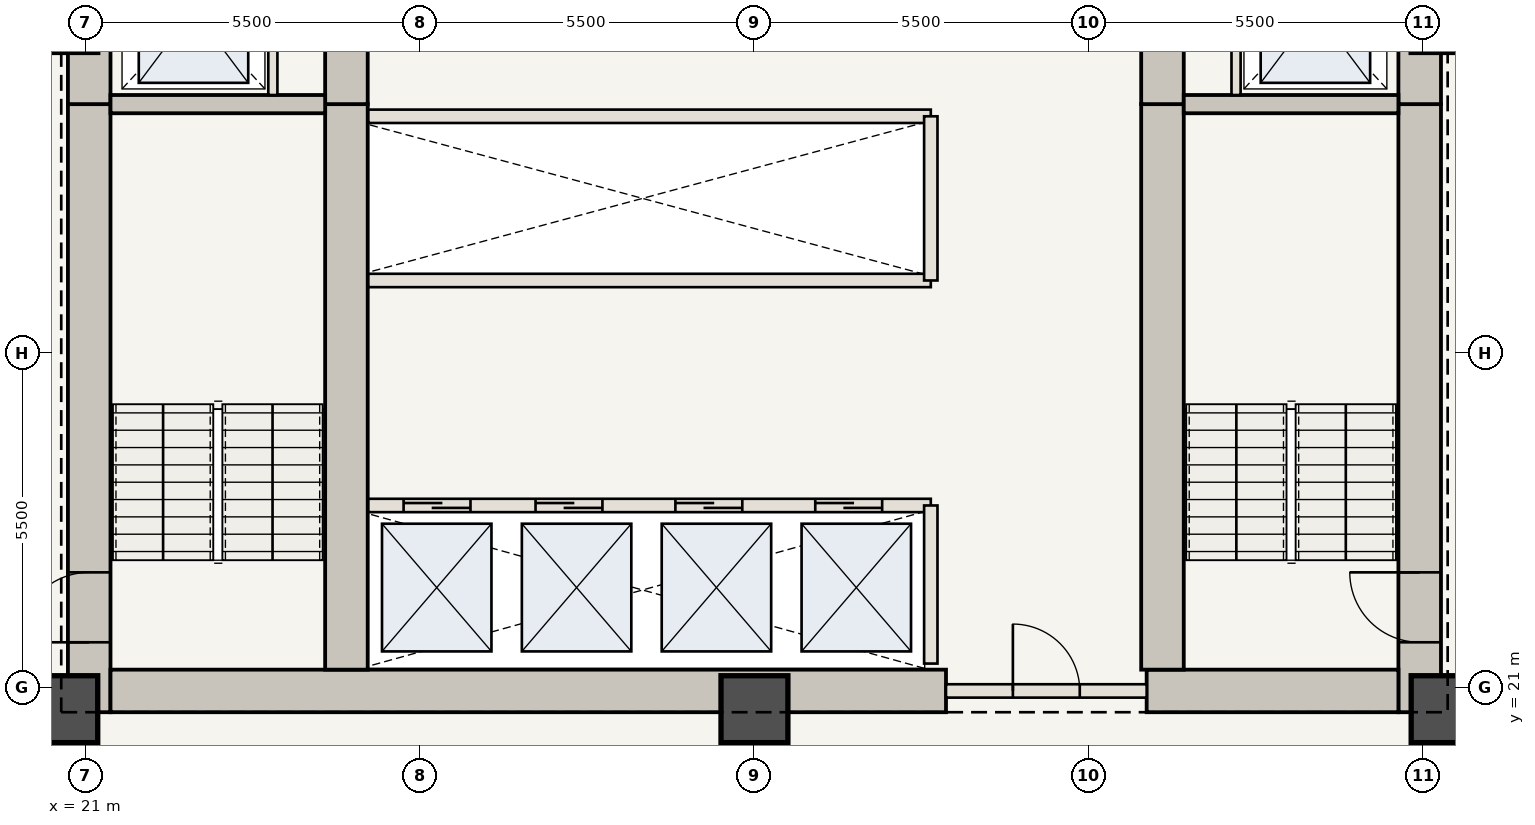
"""IFC4 building model, lengths in metres.
Left out: names, types, materials, properties, quantities, classifications, styles, units other than length and angle.
Written with IfcOpenShell. Run it as: python <this file> out.ifc"""

import sys

from ifc_helpers import new_model, si_unit, direction, frame, frame_2d, origin, origin_2d, place, context, subcontext, project, spatial, rectangle, extrude, element, fill, save


model = new_model("IFC4")
c1 = context("Model", 3, precision=1e-05, world=origin(), true_north=direction((0.0, 1.0)))
c2 = subcontext(c1, "Body", "Model", "MODEL_VIEW")
j1 = project(units=[si_unit("LENGTHUNIT", "METRE"), si_unit("PLANEANGLEUNIT", "RADIAN")], contexts=[c1])
p1 = place(None, origin())
s1 = spatial("IfcSite", under=j1, at=p1, CompositionType="ELEMENT")
p2 = place(p1, origin())
s2 = spatial("IfcBuilding", under=s1, at=p2, CompositionType="ELEMENT")
p3 = place(p2, frame((0.0, 0.0, 59.85)))
s3 = spatial("IfcBuildingStorey", under=s2, at=p3, CompositionType="ELEMENT", Elevation=59.85)
p4 = place(p3, frame((21.06, 20.6, 0.0), z_axis=(0.0, 0.0, 1.0), x_axis=(0.0, 1.0, 0.0)))
e1 = element("IfcWall", 1, at=p4, inside=s3, PredefinedType="SHEAR", context=c2, shape_type="SweptSolid", body=[
    extrude(rectangle(XDim=10.0, YDim=0.7, at=frame_2d((5.0, 0.0))), origin(), (0.0, 0.0, 1.0), 3.5),
])
p5 = place(p4, frame((1.15, 0.0, 0.0)))
e2 = element("IfcOpeningElement", 2, at=p5, cuts=e1, PredefinedType="OPENING", context=c2, shape_type="SweptSolid", body=[
    extrude(rectangle(XDim=1.15, YDim=2.15, at=frame_2d((0.575, 1.075))), frame((0.0, 0.36, 0.0), z_axis=(0.0, -1.0, 0.0), x_axis=(1.0, 0.0, 0.0)), (0.0, 0.0, 1.0), 0.72),
])
p6 = place(p3, frame((21.06, 30.6, 0.0), z_axis=(0.0, 0.0, 1.0), x_axis=(0.0, 1.0, 0.0)))
e3 = element("IfcWall", 3, at=p6, inside=s3, PredefinedType="SHEAR", context=c2, shape_type="SweptSolid", body=[
    extrude(rectangle(XDim=12.75, YDim=0.7, at=frame_2d((6.375, 0.0))), origin(), (0.0, 0.0, 1.0), 3.5),
])
p7 = place(p6, frame((4.2, 0.0, 0.0)))
e4 = element("IfcOpeningElement", 4, at=p7, cuts=e3, PredefinedType="OPENING", context=c2, shape_type="SweptSolid", body=[
    extrude(rectangle(XDim=1.1, YDim=2.15, at=frame_2d((0.55, 1.075))), frame((0.0, 0.36, 0.0), z_axis=(0.0, -1.0, 0.0), x_axis=(1.0, 0.0, 0.0)), (0.0, 0.0, 1.0), 0.72),
])
p8 = place(p6, frame((9.2, 0.0, 0.0)))
e5 = element("IfcOpeningElement", 5, at=p8, cuts=e3, PredefinedType="OPENING", context=c2, shape_type="SweptSolid", body=[
    extrude(rectangle(XDim=0.92, YDim=2.1, at=frame_2d((0.46, 1.05))), frame((0.0, 0.36, 0.0), z_axis=(0.0, -1.0, 0.0), x_axis=(1.0, 0.0, 0.0)), (0.0, 0.0, 1.0), 0.72),
])
p9 = place(p3, frame((42.94, 20.6, 0.0), z_axis=(0.0, 0.0, 1.0), x_axis=(0.0, 1.0, 0.0)))
e6 = element("IfcWall", 6, at=p9, inside=s3, PredefinedType="SHEAR", context=c2, shape_type="SweptSolid", body=[
    extrude(rectangle(XDim=10.0, YDim=0.7, at=frame_2d((5.0, 0.0))), origin(), (0.0, 0.0, 1.0), 3.5),
])
p10 = place(p9, frame((1.15, 0.0, 0.0)))
e7 = element("IfcOpeningElement", 7, at=p10, cuts=e6, PredefinedType="OPENING", context=c2, shape_type="SweptSolid", body=[
    extrude(rectangle(XDim=1.15, YDim=2.15, at=frame_2d((0.575, 1.075))), frame((0.0, 0.36, 0.0), z_axis=(0.0, -1.0, 0.0), x_axis=(1.0, 0.0, 0.0)), (0.0, 0.0, 1.0), 0.72),
])
p11 = place(p3, frame((42.94, 30.6, 0.0), z_axis=(0.0, 0.0, 1.0), x_axis=(0.0, 1.0, 0.0)))
e8 = element("IfcWall", 8, at=p11, inside=s3, PredefinedType="SHEAR", context=c2, shape_type="SweptSolid", body=[
    extrude(rectangle(XDim=12.75, YDim=0.7, at=frame_2d((6.375, 0.0))), origin(), (0.0, 0.0, 1.0), 3.5),
])
p12 = place(p11, frame((4.2, 0.0, 0.0)))
e9 = element("IfcOpeningElement", 9, at=p12, cuts=e8, PredefinedType="OPENING", context=c2, shape_type="SweptSolid", body=[
    extrude(rectangle(XDim=1.1, YDim=2.15, at=frame_2d((0.55, 1.075))), frame((0.0, 0.36, 0.0), z_axis=(0.0, -1.0, 0.0), x_axis=(1.0, 0.0, 0.0)), (0.0, 0.0, 1.0), 0.72),
])
p13 = place(p11, frame((8.4, 0.0, 0.0)))
e10 = element("IfcOpeningElement", 10, at=p13, cuts=e8, PredefinedType="OPENING", context=c2, shape_type="SweptSolid", body=[
    extrude(rectangle(XDim=0.88, YDim=2.1, at=frame_2d((0.44, 1.05))), frame((0.0, 0.36, 0.0), z_axis=(0.0, -1.0, 0.0), x_axis=(1.0, 0.0, 0.0)), (0.0, 0.0, 1.0), 0.72),
])
p14 = place(p11, frame((10.5, 0.0, 0.0)))
e11 = element("IfcOpeningElement", 11, at=p14, cuts=e8, PredefinedType="OPENING", context=c2, shape_type="SweptSolid", body=[
    extrude(rectangle(XDim=0.88, YDim=2.1, at=frame_2d((0.44, 1.05))), frame((0.0, 0.36, 0.0), z_axis=(0.0, -1.0, 0.0), x_axis=(1.0, 0.0, 0.0)), (0.0, 0.0, 1.0), 0.72),
])
p15 = place(p3, frame((21.41, 20.95, 0.0), z_axis=(0.0, 0.0, 1.0), x_axis=(1.0, 0.0, 0.0)))
e12 = element("IfcWall", 12, at=p15, inside=s3, PredefinedType="SHEAR", context=c2, shape_type="SweptSolid", body=[
    extrude(rectangle(XDim=13.74, YDim=0.7, at=frame_2d((6.87, 0.0))), origin(), (0.0, 0.0, 1.0), 3.5),
])
p16 = place(p3, frame((38.45, 20.95, 0.0), z_axis=(0.0, 0.0, 1.0), x_axis=(1.0, 0.0, 0.0)))
e13 = element("IfcWall", 13, at=p16, inside=s3, PredefinedType="SHEAR", context=c2, shape_type="SweptSolid", body=[
    extrude(rectangle(XDim=4.14, YDim=0.7, at=frame_2d((2.07, 0.0))), origin(), (0.0, 0.0, 1.0), 3.5),
])
p17 = place(p3, frame((25.29, 21.3, 0.0), z_axis=(0.0, 0.0, 1.0), x_axis=(0.0, 1.0, 0.0)))
e14 = element("IfcWall", 14, at=p17, inside=s3, PredefinedType="SHEAR", context=c2, shape_type="SweptSolid", body=[
    extrude(rectangle(XDim=9.3, YDim=0.7, at=frame_2d((4.65, 0.0))), origin(), (0.0, 0.0, 1.0), 3.5),
])
p18 = place(p3, frame((25.29, 30.6, 0.0), z_axis=(0.0, 0.0, 1.0), x_axis=(0.0, 1.0, 0.0)))
e15 = element("IfcWall", 15, at=p18, inside=s3, PredefinedType="SHEAR", context=c2, shape_type="SweptSolid", body=[
    extrude(rectangle(XDim=12.05, YDim=0.7, at=frame_2d((6.025, 0.0))), origin(), (0.0, 0.0, 1.0), 3.5),
])
p19 = place(p18, frame((6.25, 0.0, 0.0)))
e16 = element("IfcOpeningElement", 16, at=p19, cuts=e15, PredefinedType="OPENING", context=c2, shape_type="SweptSolid", body=[
    extrude(rectangle(XDim=1.1, YDim=2.15, at=frame_2d((0.55, 1.075))), frame((0.0, 0.36, 0.0), z_axis=(0.0, -1.0, 0.0), x_axis=(1.0, 0.0, 0.0)), (0.0, 0.0, 1.0), 0.72),
])
p20 = place(p3, frame((38.71, 21.3, 0.0), z_axis=(0.0, 0.0, 1.0), x_axis=(0.0, 1.0, 0.0)))
e17 = element("IfcWall", 17, at=p20, inside=s3, PredefinedType="SHEAR", context=c2, shape_type="SweptSolid", body=[
    extrude(rectangle(XDim=9.3, YDim=0.7, at=frame_2d((4.65, 0.0))), origin(), (0.0, 0.0, 1.0), 3.5),
])
p21 = place(p3, frame((38.71, 30.6, 0.0), z_axis=(0.0, 0.0, 1.0), x_axis=(0.0, 1.0, 0.0)))
e18 = element("IfcWall", 18, at=p21, inside=s3, PredefinedType="SHEAR", context=c2, shape_type="SweptSolid", body=[
    extrude(rectangle(XDim=12.05, YDim=0.7, at=frame_2d((6.025, 0.0))), origin(), (0.0, 0.0, 1.0), 3.5),
])
for number, where, z_axis, x_axis in (
    (19, (20.65, 20.65, 0.0), (0.0, 0.0, 1.0), (1.0, 0.0, 0.0)),
    (20, (32.0, 20.65, 0.0), (0.0, 0.0, 1.0), (1.0, 0.0, 0.0)),
    (21, (43.35, 20.65, 0.0), (0.0, 0.0, 1.0), (1.0, 0.0, 0.0)),
):
    element("IfcColumn", number, at=place(p3, frame(where, z_axis=z_axis, x_axis=x_axis)), inside=s3, PredefinedType="COLUMN", context=c2, shape_type="SweptSolid", body=[
        extrude(rectangle(XDim=1.1, YDim=1.1, at=origin_2d()), origin(), (0.0, 0.0, 1.0), 3.5),
    ])
for number, where, z_axis, x_axis in (
    (22, (21.41, 30.6, 0.0), (0.0, 0.0, 1.0), (1.0, 0.0, 0.0)),
    (23, (39.06, 30.6, 0.0), (0.0, 0.0, 1.0), (1.0, 0.0, 0.0)),
):
    element("IfcWall", number, at=place(p3, frame(where, z_axis=z_axis, x_axis=x_axis)), inside=s3, PredefinedType="SHEAR", context=c2, shape_type="SweptSolid", body=[
        extrude(rectangle(XDim=3.53, YDim=0.3, at=frame_2d((1.765, 0.0))), origin(), (0.0, 0.0, 1.0), 3.32),
    ])
for number, where, z_axis, x_axis in (
    (24, (24.08, 30.75, 0.0), (0.0, 0.0, 1.0), (0.0, 1.0, 0.0)),
    (25, (39.92, 30.75, 0.0), (0.0, 0.0, 1.0), (0.0, 1.0, 0.0)),
):
    element("IfcWall", number, at=place(p3, frame(where, z_axis=z_axis, x_axis=x_axis)), inside=s3, PredefinedType="STANDARD", context=c2, shape_type="SweptSolid", body=[
        extrude(rectangle(XDim=2.65, YDim=0.15, at=frame_2d((1.325, 0.0))), origin(), (0.0, 0.0, 1.0), 3.32),
    ])
p22 = place(p3, frame((35.15, 20.95, 0.0), z_axis=(0.0, 0.0, 1.0), x_axis=(1.0, 0.0, 0.0)))
e26 = element("IfcWall", 26, at=p22, inside=s3, PredefinedType="STANDARD", context=c2, shape_type="SweptSolid", body=[
    extrude(rectangle(XDim=3.3, YDim=0.22, at=frame_2d((1.65, 0.0))), origin(), (0.0, 0.0, 1.0), 3.32),
])
p23 = place(p22, frame((1.1, 0.0, 0.0)))
e27 = element("IfcOpeningElement", 27, at=p23, cuts=e26, PredefinedType="OPENING", context=c2, shape_type="SweptSolid", body=[
    extrude(rectangle(XDim=1.1, YDim=2.15, at=frame_2d((0.55, 1.075))), frame((0.0, 0.12, 0.0), z_axis=(0.0, -1.0, 0.0), x_axis=(1.0, 0.0, 0.0)), (0.0, 0.0, 1.0), 0.24),
])
p24 = place(p3, frame((25.65, 24.0, 0.0), z_axis=(0.0, 0.0, 1.0), x_axis=(1.0, 0.0, 0.0)))
e28 = element("IfcWall", 28, at=p24, inside=s3, PredefinedType="STANDARD", context=c2, shape_type="SweptSolid", body=[
    extrude(rectangle(XDim=9.25, YDim=0.22, at=frame_2d((4.625, 0.0))), origin(), (0.0, 0.0, 1.0), 3.32),
])
p25 = place(p24, frame((0.58, 0.0, 0.0)))
e29 = element("IfcOpeningElement", 29, at=p25, cuts=e28, PredefinedType="OPENING", context=c2, shape_type="SweptSolid", body=[
    extrude(rectangle(XDim=1.1, YDim=2.15, at=frame_2d((0.55, 1.075))), frame((0.0, 0.12, 0.0), z_axis=(0.0, -1.0, 0.0), x_axis=(1.0, 0.0, 0.0)), (0.0, 0.0, 1.0), 0.24),
])
p26 = place(p24, frame((2.75, 0.0, 0.0)))
e30 = element("IfcOpeningElement", 30, at=p26, cuts=e28, PredefinedType="OPENING", context=c2, shape_type="SweptSolid", body=[
    extrude(rectangle(XDim=1.1, YDim=2.15, at=frame_2d((0.55, 1.075))), frame((0.0, 0.12, 0.0), z_axis=(0.0, -1.0, 0.0), x_axis=(1.0, 0.0, 0.0)), (0.0, 0.0, 1.0), 0.24),
])
p27 = place(p24, frame((5.05, 0.0, 0.0)))
e31 = element("IfcOpeningElement", 31, at=p27, cuts=e28, PredefinedType="OPENING", context=c2, shape_type="SweptSolid", body=[
    extrude(rectangle(XDim=1.1, YDim=2.15, at=frame_2d((0.55, 1.075))), frame((0.0, 0.12, 0.0), z_axis=(0.0, -1.0, 0.0), x_axis=(1.0, 0.0, 0.0)), (0.0, 0.0, 1.0), 0.24),
])
p28 = place(p24, frame((7.35, 0.0, 0.0)))
e32 = element("IfcOpeningElement", 32, at=p28, cuts=e28, PredefinedType="OPENING", context=c2, shape_type="SweptSolid", body=[
    extrude(rectangle(XDim=1.1, YDim=2.15, at=frame_2d((0.55, 1.075))), frame((0.0, 0.12, 0.0), z_axis=(0.0, -1.0, 0.0), x_axis=(1.0, 0.0, 0.0)), (0.0, 0.0, 1.0), 0.24),
])
p29 = place(p3, frame((34.9, 21.4, 0.0), z_axis=(0.0, 0.0, 1.0), x_axis=(0.0, 1.0, 0.0)))
e33 = element("IfcWall", 33, at=p29, inside=s3, PredefinedType="STANDARD", context=c2, shape_type="SweptSolid", body=[
    extrude(rectangle(XDim=2.6, YDim=0.22, at=frame_2d((1.3, 0.0))), origin(), (0.0, 0.0, 1.0), 3.32),
])
for number, where, z_axis, x_axis in (
    (34, (25.65, 27.7, 0.0), (0.0, 0.0, 1.0), (1.0, 0.0, 0.0)),
    (35, (25.65, 30.4, 0.0), (0.0, 0.0, 1.0), (1.0, 0.0, 0.0)),
):
    element("IfcWall", number, at=place(p3, frame(where, z_axis=z_axis, x_axis=x_axis)), inside=s3, PredefinedType="STANDARD", context=c2, shape_type="SweptSolid", body=[
        extrude(rectangle(XDim=9.25, YDim=0.22, at=frame_2d((4.625, 0.0))), origin(), (0.0, 0.0, 1.0), 3.32),
    ])
p30 = place(p3, frame((34.9, 27.7, 0.0), z_axis=(0.0, 0.0, 1.0), x_axis=(0.0, 1.0, 0.0)))
e36 = element("IfcWall", 36, at=p30, inside=s3, PredefinedType="STANDARD", context=c2, shape_type="SweptSolid", body=[
    extrude(rectangle(XDim=2.7, YDim=0.22, at=frame_2d((1.35, 0.0))), origin(), (0.0, 0.0, 1.0), 3.32),
])
p31 = place(p5, origin())
e37 = element("IfcDoor", 37, at=p31, inside=s3, OperationType="SINGLE_SWING_LEFT", PredefinedType="DOOR", context=c2, shape_type="SweptSolid", body=[
    extrude(rectangle(XDim=1.15, YDim=2.15, at=frame_2d((0.575, 1.075))), frame((0.0, 0.025, 0.0), z_axis=(0.0, -1.0, 0.0), x_axis=(1.0, 0.0, 0.0)), (0.0, 0.0, 1.0), 0.05),
])
fill(e2, e37)
p32 = place(p10, origin())
e38 = element("IfcDoor", 38, at=p32, inside=s3, OperationType="SINGLE_SWING_RIGHT", PredefinedType="DOOR", context=c2, shape_type="SweptSolid", body=[
    extrude(rectangle(XDim=1.15, YDim=2.15, at=frame_2d((0.575, 1.075))), frame((0.0, 0.025, 0.0), z_axis=(0.0, -1.0, 0.0), x_axis=(1.0, 0.0, 0.0)), (0.0, 0.0, 1.0), 0.05),
])
fill(e7, e38)
p33 = place(p23, origin())
e39 = element("IfcDoor", 39, at=p33, inside=s3, OperationType="SINGLE_SWING_LEFT", PredefinedType="DOOR", context=c2, shape_type="SweptSolid", body=[
    extrude(rectangle(XDim=1.1, YDim=2.15, at=frame_2d((0.55, 1.075))), frame((0.0, 0.025, 0.0), z_axis=(0.0, -1.0, 0.0), x_axis=(1.0, 0.0, 0.0)), (0.0, 0.0, 1.0), 0.05),
])
fill(e27, e39)
p34 = place(p25, origin())
e40 = element("IfcDoor", 40, at=p34, inside=s3, OperationType="DOUBLE_DOOR_SLIDING", PredefinedType="DOOR", context=c2, shape_type="SweptSolid", body=[
    extrude(rectangle(XDim=1.1, YDim=2.15, at=frame_2d((0.55, 1.075))), frame((0.0, 0.025, 0.0), z_axis=(0.0, -1.0, 0.0), x_axis=(1.0, 0.0, 0.0)), (0.0, 0.0, 1.0), 0.05),
])
fill(e29, e40)
p35 = place(p26, origin())
e41 = element("IfcDoor", 41, at=p35, inside=s3, OperationType="DOUBLE_DOOR_SLIDING", PredefinedType="DOOR", context=c2, shape_type="SweptSolid", body=[
    extrude(rectangle(XDim=1.1, YDim=2.15, at=frame_2d((0.55, 1.075))), frame((0.0, 0.025, 0.0), z_axis=(0.0, -1.0, 0.0), x_axis=(1.0, 0.0, 0.0)), (0.0, 0.0, 1.0), 0.05),
])
fill(e30, e41)
p36 = place(p27, origin())
e42 = element("IfcDoor", 42, at=p36, inside=s3, OperationType="DOUBLE_DOOR_SLIDING", PredefinedType="DOOR", context=c2, shape_type="SweptSolid", body=[
    extrude(rectangle(XDim=1.1, YDim=2.15, at=frame_2d((0.55, 1.075))), frame((0.0, 0.025, 0.0), z_axis=(0.0, -1.0, 0.0), x_axis=(1.0, 0.0, 0.0)), (0.0, 0.0, 1.0), 0.05),
])
fill(e31, e42)
p37 = place(p28, origin())
e43 = element("IfcDoor", 43, at=p37, inside=s3, OperationType="DOUBLE_DOOR_SLIDING", PredefinedType="DOOR", context=c2, shape_type="SweptSolid", body=[
    extrude(rectangle(XDim=1.1, YDim=2.15, at=frame_2d((0.55, 1.075))), frame((0.0, 0.025, 0.0), z_axis=(0.0, -1.0, 0.0), x_axis=(1.0, 0.0, 0.0)), (0.0, 0.0, 1.0), 0.05),
])
fill(e32, e43)
save(model, sys.argv[1])
